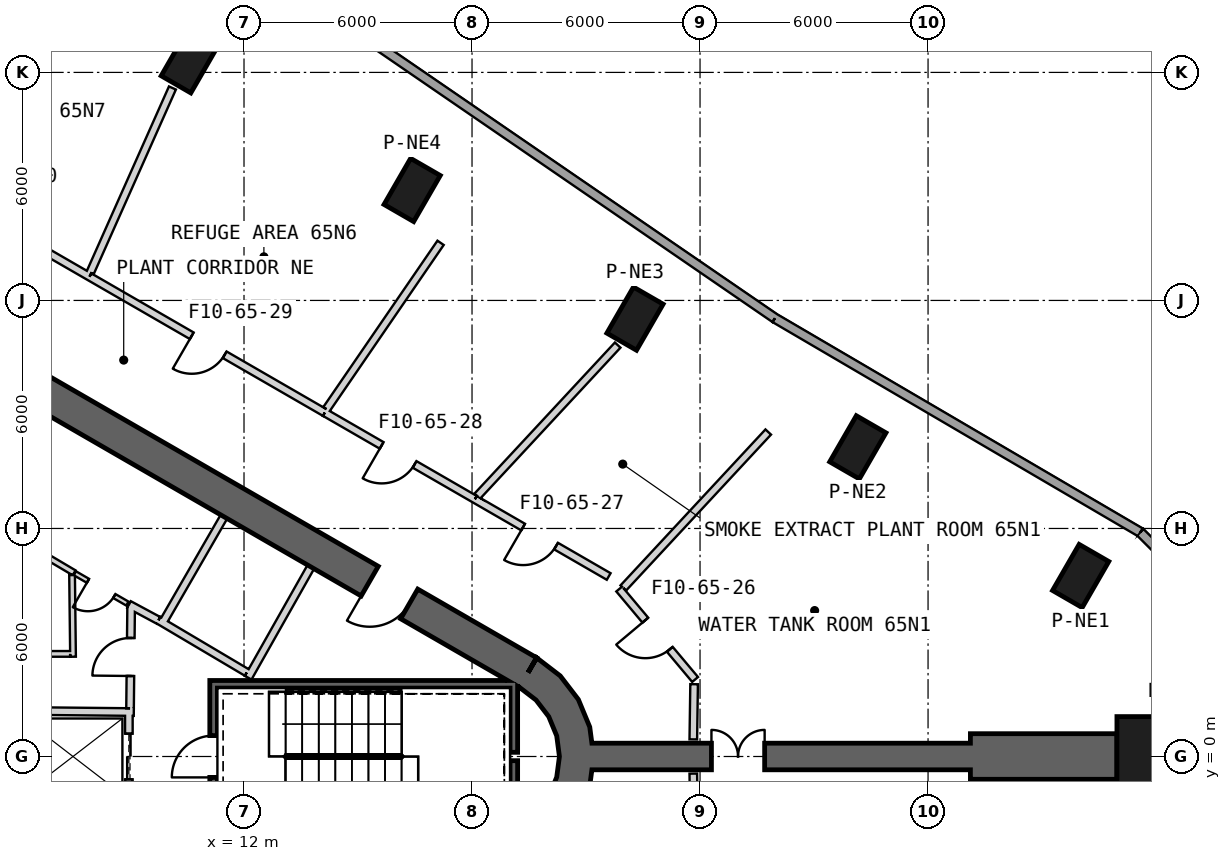
"""IFC4 building model, lengths in metres.
Left out: names, types, materials, properties, quantities, classifications, styles, units other than length and angle.
Written with IfcOpenShell. Run it as: python <this file> out.ifc"""

import sys

from ifc_helpers import new_model, si_unit, direction, frame, frame_2d, origin, origin_2d, place, context, subcontext, project, spatial, polyline, rectangle, outline, extrude, element, fill, save


model = new_model("IFC4")
c1 = context("Model", 3, precision=1e-05, world=origin(), true_north=direction((0.0, 1.0)))
c2 = subcontext(c1, "Body", "Model", "MODEL_VIEW")
j1 = project(units=[si_unit("LENGTHUNIT", "METRE"), si_unit("PLANEANGLEUNIT", "RADIAN")], contexts=[c1])
p1 = place(None, origin())
s1 = spatial("IfcSite", under=j1, at=p1, CompositionType="ELEMENT")
p2 = place(p1, origin())
s2 = spatial("IfcBuilding", under=s1, at=p2, CompositionType="ELEMENT")
p3 = place(p2, frame((0.0, 0.0, 292.7)))
s3 = spatial("IfcBuildingStorey", under=s2, at=p3, CompositionType="ELEMENT", Elevation=292.7)
p4 = place(p3, frame((36.27, 0.0, 0.0), z_axis=(0.0, 0.0, 1.0), x_axis=(1.0, 0.0, 0.0)))
e1 = element("IfcColumn", 1, at=p4, inside=s3, PredefinedType="COLUMN", context=c2, shape_type="SweptSolid", body=[
    extrude(rectangle(XDim=2.6, YDim=2.1, at=origin_2d()), origin(), (0.0, 0.0, 1.0), 5.7),
])
for number, where, z_axis, x_axis in (
    (2, (34.016, 4.75, 0.0), (0.0, 0.0, 1.0), (0.5, 0.866, 0.0)),
    (3, (28.152, 8.135, 0.0), (0.0, 0.0, 1.0), (0.5, 0.866, 0.0)),
    (4, (22.288, 11.521, 0.0), (0.0, 0.0, 1.0), (0.5, 0.866, 0.0)),
    (5, (16.425, 14.906, 0.0), (0.0, 0.0, 1.0), (0.5, 0.866, 0.0)),
    (6, (10.561, 18.292, 0.0), (0.0, 0.0, 1.0), (0.5, 0.866, 0.0)),
):
    element("IfcColumn", number, at=place(p3, frame(where, z_axis=z_axis, x_axis=x_axis)), inside=s3, PredefinedType="COLUMN", context=c2, shape_type="SweptSolid", body=[
        extrude(rectangle(XDim=1.4, YDim=0.9, at=origin_2d()), origin(), (0.0, 0.0, 1.0), 5.7),
    ])
p5 = place(p3, frame((19.475, 2.208, 0.0), z_axis=(0.0, 0.0, 1.0), x_axis=(-0.866028369851, 0.499994862586, 0.0)))
e7 = element("IfcWall", 7, at=p5, inside=s3, PredefinedType="SHEAR", context=c2, shape_type="SweptSolid", body=[
    extrude(rectangle(XDim=31.523, YDim=0.9, at=frame_2d((15.762, 0.0))), origin(), (0.0, 0.0, 1.0), 6.0),
])
p6 = place(p5, frame((3.612, 0.0, 0.0)))
e8 = element("IfcOpeningElement", 8, at=p6, cuts=e7, PredefinedType="OPENING", context=c2, shape_type="SweptSolid", body=[
    extrude(rectangle(XDim=1.2, YDim=2.4, at=frame_2d((0.6, 1.2))), frame((0.0, 0.46, 0.0), z_axis=(0.0, -1.0, 0.0), x_axis=(1.0, 0.0, 0.0)), (0.0, 0.0, 1.0), 0.92),
])
p7 = place(p5, frame((26.712, 0.0, 0.0)))
e9 = element("IfcOpeningElement", 9, at=p7, cuts=e7, PredefinedType="OPENING", context=c2, shape_type="SweptSolid", body=[
    extrude(rectangle(XDim=1.2, YDim=2.4, at=frame_2d((0.6, 1.2))), frame((0.0, 0.46, 0.0), z_axis=(0.0, -1.0, 0.0), x_axis=(1.0, 0.0, 0.0)), (0.0, 0.0, 1.0), 0.92),
])
p8 = place(p3, origin())
e10 = element("IfcWall", 10, at=p8, inside=s3, PredefinedType="SHEAR", context=c2, shape_type="SweptSolid", body=[
    extrude(outline(polyline([(19.7, -2.598), (20.321, -2.121), (20.798, -1.5), (21.098, -0.777), (21.2, 0.0), (21.098, 0.777), (20.798, 1.5), (20.321, 2.121), (19.7, 2.598), (19.25, 1.819), (19.685, 1.485), (20.019, 1.05), (20.229, 0.543), (20.3, 0.0), (20.229, -0.543), (20.019, -1.05), (19.685, -1.485), (19.25, -1.819), (19.7, -2.598)])), origin(), (0.0, 0.0, 1.0), 6.0),
])
p9 = place(p3, frame((21.15, 0.0, 0.0), z_axis=(0.0, 0.0, 1.0), x_axis=(1.0, 0.0, 0.0)))
e11 = element("IfcWall", 11, at=p9, inside=s3, PredefinedType="SHEAR", context=c2, shape_type="SweptSolid", body=[
    extrude(rectangle(XDim=9.965, YDim=0.7, at=frame_2d((4.982, 0.0))), origin(), (0.0, 0.0, 1.0), 6.0),
])
p10 = place(p9, frame((3.15, 0.0, 0.0)))
e12 = element("IfcOpeningElement", 12, at=p10, cuts=e11, PredefinedType="OPENING", context=c2, shape_type="SweptSolid", body=[
    extrude(rectangle(XDim=1.4, YDim=2.4, at=frame_2d((0.7, 1.2))), frame((0.0, 0.36, 0.0), z_axis=(0.0, -1.0, 0.0), x_axis=(1.0, 0.0, 0.0)), (0.0, 0.0, 1.0), 0.72),
])
p11 = place(p3, frame((31.115, 0.0, -0.35), z_axis=(0.0, 0.0, 1.0), x_axis=(1.0, 0.0, 0.0)))
e13 = element("IfcWall", 13, at=p11, inside=s3, PredefinedType="SHEAR", context=c2, shape_type="SweptSolid", body=[
    extrude(rectangle(XDim=3.856, YDim=1.2, at=frame_2d((1.928, 0.0))), origin(), (0.0, 0.0, 1.0), 6.35),
])
p12 = place(p3, frame((35.585, 5.899, 0.0), z_axis=(0.0, 0.0, 1.0), x_axis=(-0.862820563859, 0.505510311055, 0.0)))
e14 = element("IfcWall", 14, at=p12, inside=s3, PredefinedType="SOLIDWALL", context=c2, shape_type="SweptSolid", body=[
    extrude(rectangle(XDim=11.143, YDim=0.24, at=frame_2d((5.571, 0.0))), origin(), (0.0, 0.0, 1.0), 5.7),
])
p13 = place(p3, frame((25.971, 11.532, 0.0), z_axis=(0.0, 0.0, 1.0), x_axis=(-0.824555025779, 0.565781768408, 0.0)))
e15 = element("IfcWall", 15, at=p13, inside=s3, PredefinedType="SOLIDWALL", context=c2, shape_type="SweptSolid", body=[
    extrude(rectangle(XDim=33.547, YDim=0.24, at=frame_2d((16.774, 0.0))), origin(), (0.0, 0.0, 1.0), 5.7),
])
p14 = place(p3, frame((38.085, 3.399, 0.0), z_axis=(0.0, 0.0, 1.0), x_axis=(-0.707106781187, 0.707106781187, 0.0)))
e16 = element("IfcWall", 16, at=p14, inside=s3, PredefinedType="SOLIDWALL", context=c2, shape_type="SweptSolid", body=[
    extrude(rectangle(XDim=3.536, YDim=0.24, at=frame_2d((1.768, 0.0))), origin(), (0.0, 0.0, 1.0), 5.7),
])
p15 = place(p3, frame((9.847, 3.495, 0.0), z_axis=(0.0, 0.0, 1.0), x_axis=(0.499984717929, 0.866034226713, 0.0)))
e17 = element("IfcWall", 17, at=p15, inside=s3, PredefinedType="PLUMBINGWALL", context=c2, shape_type="SweptSolid", body=[
    extrude(rectangle(XDim=3.25, YDim=0.2, at=frame_2d((1.625, 0.0))), origin(), (0.0, 0.0, 1.0), 5.7),
])
p16 = place(p3, frame((12.11, 2.073, 0.0), z_axis=(0.0, 0.0, 1.0), x_axis=(0.49196600604, 0.870614408852, 0.0)))
e18 = element("IfcWall", 18, at=p16, inside=s3, PredefinedType="PLUMBINGWALL", context=c2, shape_type="SweptSolid", body=[
    extrude(rectangle(XDim=3.35, YDim=0.2, at=frame_2d((1.675, 0.0))), origin(), (0.0, 0.0, 1.0), 5.7),
])
p17 = place(p3, frame((12.073, 2.211, 0.0), z_axis=(0.0, 0.0, 1.0), x_axis=(-0.860414880418, 0.509594185166, 0.0)))
e19 = element("IfcWall", 19, at=p17, inside=s3, PredefinedType="PLUMBINGWALL", context=c2, shape_type="SweptSolid", body=[
    extrude(rectangle(XDim=2.7, YDim=0.2, at=frame_2d((1.35, 0.0))), origin(), (0.0, 0.0, 1.0), 5.7),
])
p18 = place(p3, frame((19.2, 1.9, -0.35), z_axis=(0.0, 0.0, 1.0), x_axis=(-1.0, 0.0, 0.0)))
e20 = element("IfcWall", 20, at=p18, inside=s3, PredefinedType="SHEAR", context=c2, shape_type="SweptSolid", body=[
    extrude(rectangle(XDim=8.1, YDim=0.2, at=frame_2d((4.05, 0.0))), origin(), (0.0, 0.0, 1.0), 6.05),
])
p19 = place(p3, frame((19.1, -2.0, -0.35), z_axis=(0.0, 0.0, 1.0), x_axis=(0.0, 1.0, 0.0)))
e21 = element("IfcWall", 21, at=p19, inside=s3, PredefinedType="SHEAR", context=c2, shape_type="SweptSolid", body=[
    extrude(rectangle(XDim=1.89, YDim=0.2, at=frame_2d((0.945, 0.0))), origin(), (0.0, 0.0, 1.0), 6.05),
])
p20 = place(p3, frame((19.1, 0.11, -0.35), z_axis=(0.0, 0.0, 1.0), x_axis=(0.0, 1.0, 0.0)))
e22 = element("IfcWall", 22, at=p20, inside=s3, PredefinedType="SHEAR", context=c2, shape_type="SweptSolid", body=[
    extrude(rectangle(XDim=1.69, YDim=0.2, at=frame_2d((0.845, 0.0))), origin(), (0.0, 0.0, 1.0), 6.05),
])
p21 = place(p3, frame((11.2, -1.8, -0.35), z_axis=(0.0, 0.0, 1.0), x_axis=(0.0, 1.0, 0.0)))
e23 = element("IfcWall", 23, at=p21, inside=s3, PredefinedType="SHEAR", context=c2, shape_type="SweptSolid", body=[
    extrude(rectangle(XDim=3.6, YDim=0.2, at=frame_2d((1.8, 0.0))), origin(), (0.0, 0.0, 1.0), 6.05),
])
p22 = place(p21, frame((1.25, 0.0, 0.35)))
e24 = element("IfcOpeningElement", 24, at=p22, cuts=e23, PredefinedType="OPENING", context=c2, shape_type="SweptSolid", body=[
    extrude(rectangle(XDim=1.1, YDim=2.1, at=frame_2d((0.55, 1.05))), frame((0.0, 0.11, 0.0), z_axis=(0.0, -1.0, 0.0), x_axis=(1.0, 0.0, 0.0)), (0.0, 0.0, 1.0), 0.22),
])
p23 = place(p3, frame((8.97, 1.2, 0.0), z_axis=(0.0, 0.0, 1.0), x_axis=(0.0, -1.0, 0.0)))
e25 = element("IfcWall", 25, at=p23, inside=s3, PredefinedType="PLUMBINGWALL", context=c2, shape_type="SweptSolid", body=[
    extrude(rectangle(XDim=2.4, YDim=0.2, at=frame_2d((1.2, 0.0))), origin(), (0.0, 0.0, 1.0), 5.7),
])
p24 = place(p23, frame((0.6, 0.0, 0.0)))
e26 = element("IfcOpeningElement", 26, at=p24, cuts=e25, PredefinedType="OPENING", context=c2, shape_type="SweptSolid", body=[
    extrude(rectangle(XDim=1.2, YDim=2.4, at=frame_2d((0.6, 1.2))), frame((0.0, 0.11, 0.0), z_axis=(0.0, -1.0, 0.0), x_axis=(1.0, 0.0, 0.0)), (0.0, 0.0, 1.0), 0.22),
])
p25 = place(p3, frame((9.1, 1.169, 0.0), z_axis=(0.0, 0.0, 1.0), x_axis=(-0.99994990606, 0.010009264196, 0.0)))
e27 = element("IfcWall", 27, at=p25, inside=s3, PredefinedType="PLUMBINGWALL", context=c2, shape_type="SweptSolid", body=[
    extrude(rectangle(XDim=3.0, YDim=0.2, at=frame_2d((1.5, 0.0))), origin(), (0.0, 0.0, 1.0), 5.7),
])
p26 = place(p3, frame((8.974, 3.999, 0.0), z_axis=(0.0, 0.0, 1.0), x_axis=(0.880917147855, -0.473270513147, 0.0)))
e28 = element("IfcWall", 28, at=p26, inside=s3, PredefinedType="PARTITIONING", context=c2, shape_type="SweptSolid", body=[
    extrude(rectangle(XDim=0.878, YDim=0.2, at=frame_2d((0.439, 0.0))), origin(), (0.0, 0.0, 1.0), 5.7),
])
p27 = place(p3, frame((7.53, 4.833, 0.0), z_axis=(0.0, 0.0, 1.0), x_axis=(-0.860550523279, 0.509365091938, 0.0)))
e29 = element("IfcWall", 29, at=p27, inside=s3, PredefinedType="PLUMBINGWALL", context=c2, shape_type="SweptSolid", body=[
    extrude(rectangle(XDim=2.755, YDim=0.15, at=frame_2d((1.377, 0.0))), origin(), (0.0, 0.0, 1.0), 5.7),
])
p28 = place(p3, frame((7.55, 4.821, 0.0), z_axis=(0.0, 0.0, 1.0), x_axis=(0.866019818373, -0.500009674092, 0.0)))
e30 = element("IfcWall", 30, at=p28, inside=s3, PredefinedType="PARTITIONING", context=c2, shape_type="SweptSolid", body=[
    extrude(rectangle(XDim=1.594, YDim=0.12, at=frame_2d((0.797, 0.0))), origin(), (0.0, 0.0, 1.0), 5.7),
])
p29 = place(p28, frame((0.397, 0.0, 0.0)))
e31 = element("IfcOpeningElement", 31, at=p29, cuts=e30, PredefinedType="OPENING", context=c2, shape_type="SweptSolid", body=[
    extrude(rectangle(XDim=0.8, YDim=2.1, at=frame_2d((0.4, 1.05))), frame((0.0, 0.07, 0.0), z_axis=(0.0, -1.0, 0.0), x_axis=(1.0, 0.0, 0.0)), (0.0, 0.0, 1.0), 0.14),
])
p30 = place(p3, frame((9.001, 1.27, 0.0), z_axis=(0.0, 0.0, 1.0), x_axis=(0.010723968736, 0.999942496594, 0.0)))
e32 = element("IfcWall", 32, at=p30, inside=s3, PredefinedType="PARTITIONING", context=c2, shape_type="SweptSolid", body=[
    extrude(rectangle(XDim=2.709, YDim=0.2, at=frame_2d((1.354, 0.0))), origin(), (0.0, 0.0, 1.0), 5.7),
])
p31 = place(p30, frame((0.848, 0.0, 0.0)))
e33 = element("IfcOpeningElement", 33, at=p31, cuts=e32, PredefinedType="OPENING", context=c2, shape_type="SweptSolid", body=[
    extrude(rectangle(XDim=1.0, YDim=2.1, at=frame_2d((0.5, 1.05))), frame((0.0, 0.11, 0.0), z_axis=(0.0, -1.0, 0.0), x_axis=(1.0, 0.0, 0.0)), (0.0, 0.0, 1.0), 0.22),
])
p32 = place(p3, frame((7.501, 2.625, 0.0), z_axis=(0.0, 0.0, 1.0), x_axis=(-0.011799927307, 0.999930378434, 0.0)))
e34 = element("IfcWall", 34, at=p32, inside=s3, PredefinedType="PLUMBINGWALL", context=c2, shape_type="SweptSolid", body=[
    extrude(rectangle(XDim=2.152, YDim=0.15, at=frame_2d((1.076, 0.0))), origin(), (0.0, 0.0, 1.0), 5.7),
])
p33 = place(p3, frame((4.425, 2.7, 0.0), z_axis=(0.0, 0.0, 1.0), x_axis=(1.0, 0.0, 0.0)))
e35 = element("IfcWall", 35, at=p33, inside=s3, PredefinedType="PLUMBINGWALL", context=c2, shape_type="SweptSolid", body=[
    extrude(rectangle(XDim=3.0, YDim=0.15, at=frame_2d((1.5, 0.0))), origin(), (0.0, 0.0, 1.0), 5.7),
])
p34 = place(p3, frame((23.87, 2.027, 0.0), z_axis=(0.0, 0.0, 1.0), x_axis=(-0.64276255853, 0.766065462837, 0.0)))
e36 = element("IfcWall", 36, at=p34, inside=s3, PredefinedType="PARTITIONING", context=c2, shape_type="SweptSolid", body=[
    extrude(rectangle(XDim=3.107, YDim=0.2, at=frame_2d((1.553, 0.0))), origin(), (0.0, 0.0, 1.0), 4.88),
])
p35 = place(p34, frame((1.037, 0.0, 0.0)))
e37 = element("IfcOpeningElement", 37, at=p35, cuts=e36, PredefinedType="OPENING", context=c2, shape_type="SweptSolid", body=[
    extrude(rectangle(XDim=1.0, YDim=2.1, at=frame_2d((0.5, 1.05))), frame((0.0, 0.11, 0.0), z_axis=(0.0, -1.0, 0.0), x_axis=(1.0, 0.0, 0.0)), (0.0, 0.0, 1.0), 0.22),
])
p36 = place(p3, frame((23.823, 0.45, 0.0), z_axis=(0.0, 0.0, 1.0), x_axis=(0.014625200909, 0.99989304603, 0.0)))
e38 = element("IfcWall", 38, at=p36, inside=s3, PredefinedType="PARTITIONING", context=c2, shape_type="SweptSolid", body=[
    extrude(rectangle(XDim=1.452, YDim=0.2, at=frame_2d((0.726, 0.0))), origin(), (0.0, 0.0, 1.0), 5.7),
])
p37 = place(p3, frame((21.596, 4.736, 0.0), z_axis=(0.0, 0.0, 1.0), x_axis=(-0.86599454633, 0.50005344287, 0.0)))
e39 = element("IfcWall", 39, at=p37, inside=s3, PredefinedType="PARTITIONING", context=c2, shape_type="SweptSolid", body=[
    extrude(rectangle(XDim=4.065, YDim=0.2, at=frame_2d((2.032, 0.0))), origin(), (0.0, 0.0, 1.0), 4.98),
])
p38 = place(p37, frame((1.6, 0.0, 0.0)))
e40 = element("IfcOpeningElement", 40, at=p38, cuts=e39, PredefinedType="OPENING", context=c2, shape_type="SweptSolid", body=[
    extrude(rectangle(XDim=1.0, YDim=2.1, at=frame_2d((0.5, 1.05))), frame((0.0, 0.11, 0.0), z_axis=(0.0, -1.0, 0.0), x_axis=(1.0, 0.0, 0.0)), (0.0, 0.0, 1.0), 0.22),
])
p39 = place(p3, frame((18.076, 6.769, 0.0), z_axis=(0.0, 0.0, 1.0), x_axis=(-0.866026870347, 0.499997459831, 0.0)))
e41 = element("IfcWall", 41, at=p39, inside=s3, PredefinedType="PARTITIONING", context=c2, shape_type="SweptSolid", body=[
    extrude(rectangle(XDim=4.56, YDim=0.2, at=frame_2d((2.28, 0.0))), origin(), (0.0, 0.0, 1.0), 5.07),
])
p40 = place(p39, frame((1.833, 0.0, 0.0)))
e42 = element("IfcOpeningElement", 42, at=p40, cuts=e41, PredefinedType="OPENING", context=c2, shape_type="SweptSolid", body=[
    extrude(rectangle(XDim=1.0, YDim=2.1, at=frame_2d((0.5, 1.05))), frame((0.0, 0.11, 0.0), z_axis=(0.0, -1.0, 0.0), x_axis=(1.0, 0.0, 0.0)), (0.0, 0.0, 1.0), 0.22),
])
p41 = place(p3, frame((14.127, 9.049, 0.0), z_axis=(0.0, 0.0, 1.0), x_axis=(-0.86603096638, 0.499990365178, 0.0)))
e43 = element("IfcWall", 43, at=p41, inside=s3, PredefinedType="PARTITIONING", context=c2, shape_type="SweptSolid", body=[
    extrude(rectangle(XDim=7.152, YDim=0.2, at=frame_2d((3.576, 0.0))), origin(), (0.0, 0.0, 1.0), 5.07),
])
p42 = place(p41, frame((3.044, 0.0, 0.0)))
e44 = element("IfcOpeningElement", 44, at=p42, cuts=e43, PredefinedType="OPENING", context=c2, shape_type="SweptSolid", body=[
    extrude(rectangle(XDim=1.0, YDim=2.1, at=frame_2d((0.5, 1.05))), frame((0.0, 0.11, 0.0), z_axis=(0.0, -1.0, 0.0), x_axis=(1.0, 0.0, 0.0)), (0.0, 0.0, 1.0), 0.22),
])
p43 = place(p3, frame((7.933, 12.625, 0.0), z_axis=(0.0, 0.0, 1.0), x_axis=(-0.866022320763, 0.500005339912, 0.0)))
e45 = element("IfcWall", 45, at=p43, inside=s3, PredefinedType="PARTITIONING", context=c2, shape_type="SweptSolid", body=[
    extrude(rectangle(XDim=7.172, YDim=0.2, at=frame_2d((3.586, 0.0))), origin(), (0.0, 0.0, 1.0), 5.07),
])
p44 = place(p43, frame((3.059, 0.0, 0.0)))
e46 = element("IfcOpeningElement", 46, at=p44, cuts=e45, PredefinedType="OPENING", context=c2, shape_type="SweptSolid", body=[
    extrude(rectangle(XDim=1.0, YDim=2.1, at=frame_2d((0.5, 1.05))), frame((0.0, 0.11, 0.0), z_axis=(0.0, -1.0, 0.0), x_axis=(1.0, 0.0, 0.0)), (0.0, 0.0, 1.0), 0.22),
])
p45 = place(p3, frame((25.795, 8.538, 0.0), z_axis=(0.0, 0.0, 1.0), x_axis=(-0.680793666596, -0.732475244307, 0.0)))
e47 = element("IfcWall", 47, at=p45, inside=s3, PredefinedType="PARTITIONING", context=c2, shape_type="SweptSolid", body=[
    extrude(rectangle(XDim=5.603, YDim=0.2, at=frame_2d((2.801, 0.0))), origin(), (0.0, 0.0, 1.0), 4.98),
])
p46 = place(p3, frame((18.137, 6.849, 0.0), z_axis=(0.0, 0.0, 1.0), x_axis=(0.680749483241, 0.732516307714, 0.0)))
e48 = element("IfcWall", 48, at=p46, inside=s3, PredefinedType="PARTITIONING", context=c2, shape_type="SweptSolid", body=[
    extrude(rectangle(XDim=5.428, YDim=0.2, at=frame_2d((2.714, 0.0))), origin(), (0.0, 0.0, 1.0), 5.7),
])
p47 = place(p3, frame((14.17, 9.14, 0.0), z_axis=(0.0, 0.0, 1.0), x_axis=(0.565765233093, 0.824566371509, 0.0)))
e49 = element("IfcWall", 49, at=p47, inside=s3, PredefinedType="PARTITIONING", context=c2, shape_type="SweptSolid", body=[
    extrude(rectangle(XDim=5.307, YDim=0.2, at=frame_2d((2.654, 0.0))), origin(), (0.0, 0.0, 1.0), 5.7),
])
p48 = place(p3, frame((10.116, 17.59, 0.0), z_axis=(0.0, 0.0, 1.0), x_axis=(-0.406734425958, -0.913546444764, 0.0)))
e50 = element("IfcWall", 50, at=p48, inside=s3, PredefinedType="PARTITIONING", context=c2, shape_type="SweptSolid", body=[
    extrude(rectangle(XDim=5.321, YDim=0.2, at=frame_2d((2.66, 0.0))), origin(), (0.0, 0.0, 1.0), 5.07),
])
p49 = place(p3, frame((23.847, -2.092, 0.0), z_axis=(0.0, 0.0, 1.0), x_axis=(-0.014566612506, 0.999893901272, 0.0)))
e51 = element("IfcWall", 51, at=p49, inside=s3, PredefinedType="PARTITIONING", context=c2, shape_type="SweptSolid", body=[
    extrude(rectangle(XDim=1.643, YDim=0.2, at=frame_2d((0.821, 0.0))), origin(), (0.0, 0.0, 1.0), 5.7),
])
p50 = place(p22, origin())
e52 = element("IfcDoor", 52, at=p50, inside=s3, OperationType="SINGLE_SWING_LEFT", PredefinedType="USERDEFINED", context=c2, shape_type="SweptSolid", body=[
    extrude(rectangle(XDim=1.1, YDim=2.1, at=frame_2d((0.55, 1.05))), frame((0.0, 0.025, 0.0), z_axis=(0.0, -1.0, 0.0), x_axis=(1.0, 0.0, 0.0)), (0.0, 0.0, 1.0), 0.05),
])
fill(e24, e52)
p51 = place(p31, origin())
e53 = element("IfcDoor", 53, at=p51, inside=s3, OperationType="SINGLE_SWING_LEFT", PredefinedType="USERDEFINED", context=c2, shape_type="SweptSolid", body=[
    extrude(rectangle(XDim=1.0, YDim=2.1, at=frame_2d((0.5, 1.05))), frame((0.0, 0.025, 0.0), z_axis=(0.0, -1.0, 0.0), x_axis=(1.0, 0.0, 0.0)), (0.0, 0.0, 1.0), 0.05),
])
fill(e33, e53)
p52 = place(p24, origin())
e54 = element("IfcDoor", 54, at=p52, inside=s3, OperationType="SLIDING_TO_LEFT", PredefinedType="USERDEFINED", context=c2, shape_type="SweptSolid", body=[
    extrude(rectangle(XDim=1.2, YDim=2.4, at=frame_2d((0.6, 1.2))), frame((0.0, 0.025, 0.0), z_axis=(0.0, -1.0, 0.0), x_axis=(1.0, 0.0, 0.0)), (0.0, 0.0, 1.0), 0.05),
])
fill(e26, e54)
p53 = place(p29, origin())
e55 = element("IfcDoor", 55, at=p53, inside=s3, OperationType="SINGLE_SWING_LEFT", PredefinedType="USERDEFINED", context=c2, shape_type="SweptSolid", body=[
    extrude(rectangle(XDim=0.8, YDim=2.1, at=frame_2d((0.4, 1.05))), frame((0.0, 0.025, 0.0), z_axis=(0.0, -1.0, 0.0), x_axis=(1.0, 0.0, 0.0)), (0.0, 0.0, 1.0), 0.05),
])
fill(e31, e55)
p54 = place(p35, origin())
e56 = element("IfcDoor", 56, at=p54, inside=s3, OperationType="SINGLE_SWING_RIGHT", PredefinedType="USERDEFINED", context=c2, shape_type="SweptSolid", body=[
    extrude(rectangle(XDim=1.0, YDim=2.1, at=frame_2d((0.5, 1.05))), frame((0.0, 0.025, 0.0), z_axis=(0.0, -1.0, 0.0), x_axis=(1.0, 0.0, 0.0)), (0.0, 0.0, 1.0), 0.05),
])
fill(e37, e56)
p55 = place(p38, origin())
e57 = element("IfcDoor", 57, at=p55, inside=s3, OperationType="SINGLE_SWING_RIGHT", PredefinedType="USERDEFINED", context=c2, shape_type="SweptSolid", body=[
    extrude(rectangle(XDim=1.0, YDim=2.1, at=frame_2d((0.5, 1.05))), frame((0.0, 0.025, 0.0), z_axis=(0.0, -1.0, 0.0), x_axis=(1.0, 0.0, 0.0)), (0.0, 0.0, 1.0), 0.05),
])
fill(e40, e57)
p56 = place(p40, origin())
e58 = element("IfcDoor", 58, at=p56, inside=s3, OperationType="SINGLE_SWING_RIGHT", PredefinedType="USERDEFINED", context=c2, shape_type="SweptSolid", body=[
    extrude(rectangle(XDim=1.0, YDim=2.1, at=frame_2d((0.5, 1.05))), frame((0.0, 0.025, 0.0), z_axis=(0.0, -1.0, 0.0), x_axis=(1.0, 0.0, 0.0)), (0.0, 0.0, 1.0), 0.05),
])
fill(e42, e58)
p57 = place(p42, origin())
e59 = element("IfcDoor", 59, at=p57, inside=s3, OperationType="SINGLE_SWING_RIGHT", PredefinedType="USERDEFINED", context=c2, shape_type="SweptSolid", body=[
    extrude(rectangle(XDim=1.0, YDim=2.1, at=frame_2d((0.5, 1.05))), frame((0.0, 0.025, 0.0), z_axis=(0.0, -1.0, 0.0), x_axis=(1.0, 0.0, 0.0)), (0.0, 0.0, 1.0), 0.05),
])
fill(e44, e59)
p58 = place(p6, origin())
e60 = element("IfcDoor", 60, at=p58, inside=s3, OperationType="SINGLE_SWING_RIGHT", PredefinedType="USERDEFINED", context=c2, shape_type="SweptSolid", body=[
    extrude(rectangle(XDim=1.2, YDim=2.4, at=frame_2d((0.6, 1.2))), frame((0.0, 0.025, 0.0), z_axis=(0.0, -1.0, 0.0), x_axis=(1.0, 0.0, 0.0)), (0.0, 0.0, 1.0), 0.05),
])
fill(e8, e60)
p59 = place(p10, origin())
e61 = element("IfcDoor", 61, at=p59, inside=s3, OperationType="DOUBLE_DOOR_SINGLE_SWING", PredefinedType="NOTDEFINED", context=c2, shape_type="SweptSolid", body=[
    extrude(rectangle(XDim=1.4, YDim=2.4, at=frame_2d((0.7, 1.2))), frame((0.0, 0.025, 0.0), z_axis=(0.0, -1.0, 0.0), x_axis=(1.0, 0.0, 0.0)), (0.0, 0.0, 1.0), 0.05),
])
fill(e12, e61)
save(model, sys.argv[1])
